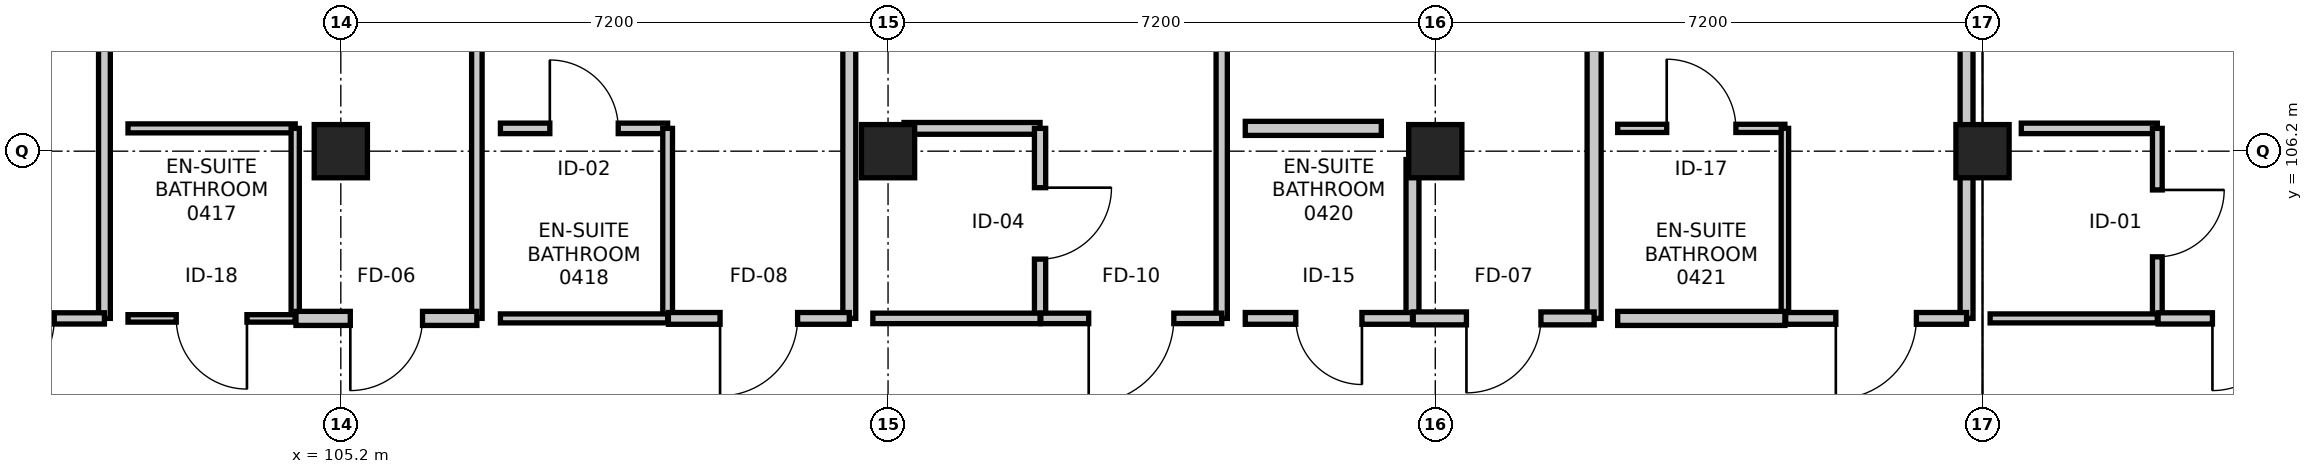
"""IFC4 building model, lengths in metres.
Left out: names, types, materials, properties, quantities, classifications, styles, units other than length and angle.
Written with IfcOpenShell. Run it as: python <this file> out.ifc"""

import sys

from ifc_helpers import new_model, si_unit, direction, frame, frame_2d, origin, origin_2d, place, context, subcontext, project, spatial, rectangle, extrude, element, fill, save


model = new_model("IFC4")
c1 = context("Model", 3, precision=1e-05, world=origin(), true_north=direction((0.0, 1.0)))
c2 = subcontext(c1, "Body", "Model", "MODEL_VIEW")
j1 = project(units=[si_unit("LENGTHUNIT", "METRE"), si_unit("PLANEANGLEUNIT", "RADIAN")], contexts=[c1])
p1 = place(None, origin())
s1 = spatial("IfcSite", under=j1, at=p1, CompositionType="ELEMENT")
p2 = place(p1, origin())
s2 = spatial("IfcBuilding", under=s1, at=p2, CompositionType="ELEMENT")
p3 = place(p2, frame((0.0, 0.0, 19.2)))
s3 = spatial("IfcBuildingStorey", under=s2, at=p3, CompositionType="ELEMENT", Elevation=19.2)
for number, where, z_axis, x_axis in (
    (1, (105.2, 106.2, 0.0), (0.0, 0.0, 1.0), (1.0, 0.0, 0.0)),
    (2, (112.4, 106.2, 0.0), (0.0, 0.0, 1.0), (1.0, 0.0, 0.0)),
    (3, (119.6, 106.2, 0.0), (0.0, 0.0, 1.0), (1.0, 0.0, 0.0)),
    (4, (126.8, 106.2, 0.0), (0.0, 0.0, 1.0), (1.0, 0.0, 0.0)),
):
    element("IfcColumn", number, at=place(p3, frame(where, z_axis=z_axis, x_axis=x_axis)), inside=s3, PredefinedType="COLUMN", context=c2, shape_type="SweptSolid", body=[
        extrude(rectangle(XDim=0.7, YDim=0.7, at=origin_2d()), origin(), (0.0, 0.0, 1.0), 3.6),
    ])
p4 = place(p3, frame((102.09, 116.126, 0.0), z_axis=(0.0, 0.0, 1.0), x_axis=(0.0, -1.0, 0.0)))
e5 = element("IfcWall", 5, at=p4, inside=s3, PredefinedType="PARTITIONING", context=c2, shape_type="SweptSolid", body=[
    extrude(rectangle(XDim=12.126, YDim=0.155, at=frame_2d((6.063, 0.0))), origin(), (0.0, 0.0, 1.0), 2.735),
])
p5 = place(p3, frame((102.09, 104.0, 0.0), z_axis=(0.0, 0.0, 1.0), x_axis=(-1.0, 0.0, 0.0)))
e6 = element("IfcWall", 6, at=p5, inside=s3, PredefinedType="PARTITIONING", context=c2, shape_type="SweptSolid", body=[
    extrude(rectangle(XDim=2.38, YDim=0.148, at=frame_2d((1.19, 0.0))), origin(), (0.0, 0.0, 1.0), 3.35),
])
p6 = place(p5, frame((0.66, 0.0, 0.0)))
e7 = element("IfcOpeningElement", 7, at=p6, cuts=e6, PredefinedType="OPENING", context=c2, shape_type="SweptSolid", body=[
    extrude(rectangle(XDim=1.06, YDim=2.2, at=frame_2d((0.53, 1.1))), frame((0.0, 0.084, 0.0), z_axis=(0.0, -1.0, 0.0), x_axis=(1.0, 0.0, 0.0)), (0.0, 0.0, 1.0), 0.168),
])
p7 = place(p3, frame((102.4, 106.5, 0.0), z_axis=(0.0, 0.0, 1.0), x_axis=(1.0, 0.0, 0.0)))
e8 = element("IfcWall", 8, at=p7, inside=s3, PredefinedType="PARTITIONING", context=c2, shape_type="SweptSolid", body=[
    extrude(rectangle(XDim=2.2, YDim=0.118, at=frame_2d((1.1, 0.0))), origin(), (0.0, 0.0, 1.0), 3.35),
])
p8 = place(p3, frame((104.6, 106.5, 0.0), z_axis=(0.0, 0.0, 1.0), x_axis=(0.0, -1.0, 0.0)))
e9 = element("IfcWall", 9, at=p8, inside=s3, PredefinedType="PARTITIONING", context=c2, shape_type="SweptSolid", body=[
    extrude(rectangle(XDim=2.5, YDim=0.108, at=frame_2d((1.25, 0.0))), origin(), (0.0, 0.0, 1.0), 2.735),
])
p9 = place(p3, frame((104.6, 104.0, 0.0), z_axis=(0.0, 0.0, 1.0), x_axis=(-1.0, 0.0, 0.0)))
e10 = element("IfcWall", 10, at=p9, inside=s3, PredefinedType="PARTITIONING", context=c2, shape_type="SweptSolid", body=[
    extrude(rectangle(XDim=2.2, YDim=0.098, at=frame_2d((1.1, 0.0))), origin(), (0.0, 0.0, 1.0), 3.35),
])
p10 = place(p9, frame((0.635, 0.0, 0.0)))
e11 = element("IfcOpeningElement", 11, at=p10, cuts=e10, PredefinedType="OPENING", context=c2, shape_type="SweptSolid", body=[
    extrude(rectangle(XDim=0.93, YDim=2.13, at=frame_2d((0.465, 1.065))), frame((0.0, 0.059, 0.0), z_axis=(0.0, -1.0, 0.0), x_axis=(1.0, 0.0, 0.0)), (0.0, 0.0, 1.0), 0.118),
])
p11 = place(p3, frame((106.99, 116.04, 0.0), z_axis=(0.0, 0.0, 1.0), x_axis=(0.0, -1.0, 0.0)))
e12 = element("IfcWall", 12, at=p11, inside=s3, PredefinedType="PARTITIONING", context=c2, shape_type="SweptSolid", body=[
    extrude(rectangle(XDim=12.04, YDim=0.138, at=frame_2d((6.02, 0.0))), origin(), (0.0, 0.0, 1.0), 2.735),
])
p12 = place(p3, frame((106.99, 104.0, 0.0), z_axis=(0.0, 0.0, 1.0), x_axis=(-1.0, 0.0, 0.0)))
e13 = element("IfcWall", 13, at=p12, inside=s3, PredefinedType="PARTITIONING", context=c2, shape_type="SweptSolid", body=[
    extrude(rectangle(XDim=2.38, YDim=0.185, at=frame_2d((1.19, 0.0))), origin(), (0.0, 0.0, 1.0), 2.685),
])
p13 = place(p12, frame((0.715, 0.0, 0.0)))
e14 = element("IfcOpeningElement", 14, at=p13, cuts=e13, PredefinedType="OPENING", context=c2, shape_type="SweptSolid", body=[
    extrude(rectangle(XDim=0.95, YDim=2.1, at=frame_2d((0.475, 1.05))), frame((0.0, 0.103, 0.0), z_axis=(0.0, -1.0, 0.0), x_axis=(1.0, 0.0, 0.0)), (0.0, 0.0, 1.0), 0.205),
])
p14 = place(p3, frame((107.3, 106.5, 0.0), z_axis=(0.0, 0.0, 1.0), x_axis=(1.0, 0.0, 0.0)))
e15 = element("IfcWall", 15, at=p14, inside=s3, PredefinedType="PARTITIONING", context=c2, shape_type="SweptSolid", body=[
    extrude(rectangle(XDim=2.2, YDim=0.138, at=frame_2d((1.1, 0.0))), origin(), (0.0, 0.0, 1.0), 3.35),
])
p15 = place(p14, frame((0.65, 0.0, 0.0)))
e16 = element("IfcOpeningElement", 16, at=p15, cuts=e15, PredefinedType="OPENING", context=c2, shape_type="SweptSolid", body=[
    extrude(rectangle(XDim=0.9, YDim=2.08, at=frame_2d((0.45, 1.04))), frame((0.0, 0.079, 0.0), z_axis=(0.0, -1.0, 0.0), x_axis=(1.0, 0.0, 0.0)), (0.0, 0.0, 1.0), 0.158),
])
p16 = place(p3, frame((109.5, 106.5, 0.0), z_axis=(0.0, 0.0, 1.0), x_axis=(0.0, -1.0, 0.0)))
e17 = element("IfcWall", 17, at=p16, inside=s3, PredefinedType="PARTITIONING", context=c2, shape_type="SweptSolid", body=[
    extrude(rectangle(XDim=2.5, YDim=0.128, at=frame_2d((1.25, 0.0))), origin(), (0.0, 0.0, 1.0), 2.735),
])
p17 = place(p3, frame((109.5, 104.0, 0.0), z_axis=(0.0, 0.0, 1.0), x_axis=(-1.0, 0.0, 0.0)))
e18 = element("IfcWall", 18, at=p17, inside=s3, PredefinedType="PARTITIONING", context=c2, shape_type="SweptSolid", body=[
    extrude(rectangle(XDim=2.2, YDim=0.118, at=frame_2d((1.1, 0.0))), origin(), (0.0, 0.0, 1.0), 3.35),
])
p18 = place(p3, frame((111.89, 115.892, 0.0), z_axis=(0.0, 0.0, 1.0), x_axis=(0.0, -1.0, 0.0)))
e19 = element("IfcWall", 19, at=p18, inside=s3, PredefinedType="PARTITIONING", context=c2, shape_type="SweptSolid", body=[
    extrude(rectangle(XDim=11.892, YDim=0.17, at=frame_2d((5.946, 0.0))), origin(), (0.0, 0.0, 1.0), 2.735),
])
p19 = place(p3, frame((111.89, 104.0, 0.0), z_axis=(0.0, 0.0, 1.0), x_axis=(-1.0, 0.0, 0.0)))
e20 = element("IfcWall", 20, at=p19, inside=s3, PredefinedType="PARTITIONING", context=c2, shape_type="SweptSolid", body=[
    extrude(rectangle(XDim=2.38, YDim=0.155, at=frame_2d((1.19, 0.0))), origin(), (0.0, 0.0, 1.0), 3.35),
])
p20 = place(p19, frame((0.68, 0.0, 0.0)))
e21 = element("IfcOpeningElement", 21, at=p20, cuts=e20, PredefinedType="OPENING", context=c2, shape_type="SweptSolid", body=[
    extrude(rectangle(XDim=1.02, YDim=2.15, at=frame_2d((0.51, 1.075))), frame((0.0, 0.087, 0.0), z_axis=(0.0, -1.0, 0.0), x_axis=(1.0, 0.0, 0.0)), (0.0, 0.0, 1.0), 0.175),
])
p21 = place(p3, frame((112.61, 106.5, 0.0), z_axis=(0.0, 0.0, 1.0), x_axis=(1.0, 0.0, 0.0)))
e22 = element("IfcWall", 22, at=p21, inside=s3, PredefinedType="PARTITIONING", context=c2, shape_type="SweptSolid", body=[
    extrude(rectangle(XDim=1.79, YDim=0.155, at=frame_2d((0.895, 0.0))), origin(), (0.0, 0.0, 1.0), 2.685),
])
p22 = place(p3, frame((114.4, 106.5, 0.0), z_axis=(0.0, 0.0, 1.0), x_axis=(0.0, -1.0, 0.0)))
e23 = element("IfcWall", 23, at=p22, inside=s3, PredefinedType="PARTITIONING", context=c2, shape_type="SweptSolid", body=[
    extrude(rectangle(XDim=2.5, YDim=0.148, at=frame_2d((1.25, 0.0))), origin(), (0.0, 0.0, 1.0), 2.735),
])
p23 = place(p22, frame((0.78, 0.0, 0.0)))
e24 = element("IfcOpeningElement", 24, at=p23, cuts=e23, PredefinedType="OPENING", context=c2, shape_type="SweptSolid", body=[
    extrude(rectangle(XDim=0.94, YDim=2.12, at=frame_2d((0.47, 1.06))), frame((0.0, 0.084, 0.0), z_axis=(0.0, -1.0, 0.0), x_axis=(1.0, 0.0, 0.0)), (0.0, 0.0, 1.0), 0.168),
])
p24 = place(p3, frame((114.4, 104.0, 0.0), z_axis=(0.0, 0.0, 1.0), x_axis=(-1.0, 0.0, 0.0)))
e25 = element("IfcWall", 25, at=p24, inside=s3, PredefinedType="PARTITIONING", context=c2, shape_type="SweptSolid", body=[
    extrude(rectangle(XDim=2.2, YDim=0.138, at=frame_2d((1.1, 0.0))), origin(), (0.0, 0.0, 1.0), 2.685),
])
p25 = place(p3, frame((116.79, 115.687, 0.0), z_axis=(0.0, 0.0, 1.0), x_axis=(0.0, -1.0, 0.0)))
e26 = element("IfcWall", 26, at=p25, inside=s3, PredefinedType="PARTITIONING", context=c2, shape_type="SweptSolid", body=[
    extrude(rectangle(XDim=11.687, YDim=0.148, at=frame_2d((5.844, 0.0))), origin(), (0.0, 0.0, 1.0), 2.735),
])
p26 = place(p3, frame((116.79, 104.0, 0.0), z_axis=(0.0, 0.0, 1.0), x_axis=(-1.0, 0.0, 0.0)))
e27 = element("IfcWall", 27, at=p26, inside=s3, PredefinedType="PARTITIONING", context=c2, shape_type="SweptSolid", body=[
    extrude(rectangle(XDim=2.38, YDim=0.138, at=frame_2d((1.19, 0.0))), origin(), (0.0, 0.0, 1.0), 3.35),
])
p27 = place(p26, frame((0.63, 0.0, 0.0)))
e28 = element("IfcOpeningElement", 28, at=p27, cuts=e27, PredefinedType="OPENING", context=c2, shape_type="SweptSolid", body=[
    extrude(rectangle(XDim=1.12, YDim=2.2, at=frame_2d((0.56, 1.1))), frame((0.0, 0.079, 0.0), z_axis=(0.0, -1.0, 0.0), x_axis=(1.0, 0.0, 0.0)), (0.0, 0.0, 1.0), 0.158),
])
p28 = place(p3, frame((117.1, 106.5, 0.0), z_axis=(0.0, 0.0, 1.0), x_axis=(1.0, 0.0, 0.0)))
e29 = element("IfcWall", 29, at=p28, inside=s3, PredefinedType="PARTITIONING", context=c2, shape_type="SweptSolid", body=[
    extrude(rectangle(XDim=1.79, YDim=0.185, at=frame_2d((0.895, 0.0))), origin(), (0.0, 0.0, 1.0), 2.735),
])
p29 = place(p3, frame((119.3, 106.09, 0.0), z_axis=(0.0, 0.0, 1.0), x_axis=(0.0, -1.0, 0.0)))
e30 = element("IfcWall", 30, at=p29, inside=s3, PredefinedType="PARTITIONING", context=c2, shape_type="SweptSolid", body=[
    extrude(rectangle(XDim=2.09, YDim=0.17, at=frame_2d((1.045, 0.0))), origin(), (0.0, 0.0, 1.0), 2.685),
])
p30 = place(p3, frame((119.3, 104.0, 0.0), z_axis=(0.0, 0.0, 1.0), x_axis=(-1.0, 0.0, 0.0)))
e31 = element("IfcWall", 31, at=p30, inside=s3, PredefinedType="PARTITIONING", context=c2, shape_type="SweptSolid", body=[
    extrude(rectangle(XDim=2.2, YDim=0.155, at=frame_2d((1.1, 0.0))), origin(), (0.0, 0.0, 1.0), 3.35),
])
p31 = place(p30, frame((0.665, 0.0, 0.0)))
e32 = element("IfcOpeningElement", 32, at=p31, cuts=e31, PredefinedType="OPENING", context=c2, shape_type="SweptSolid", body=[
    extrude(rectangle(XDim=0.87, YDim=2.07, at=frame_2d((0.435, 1.035))), frame((0.0, 0.087, 0.0), z_axis=(0.0, -1.0, 0.0), x_axis=(1.0, 0.0, 0.0)), (0.0, 0.0, 1.0), 0.175),
])
p32 = place(p3, frame((121.69, 115.433, 0.0), z_axis=(0.0, 0.0, 1.0), x_axis=(0.0, -1.0, 0.0)))
e33 = element("IfcWall", 33, at=p32, inside=s3, PredefinedType="PARTITIONING", context=c2, shape_type="SweptSolid", body=[
    extrude(rectangle(XDim=11.433, YDim=0.185, at=frame_2d((5.716, 0.0))), origin(), (0.0, 0.0, 1.0), 2.735),
])
p33 = place(p3, frame((121.69, 104.0, 0.0), z_axis=(0.0, 0.0, 1.0), x_axis=(-1.0, 0.0, 0.0)))
e34 = element("IfcWall", 34, at=p33, inside=s3, PredefinedType="PARTITIONING", context=c2, shape_type="SweptSolid", body=[
    extrude(rectangle(XDim=2.38, YDim=0.17, at=frame_2d((1.19, 0.0))), origin(), (0.0, 0.0, 1.0), 2.685),
])
p34 = place(p33, frame((0.7, 0.0, 0.0)))
e35 = element("IfcOpeningElement", 35, at=p34, cuts=e34, PredefinedType="OPENING", context=c2, shape_type="SweptSolid", body=[
    extrude(rectangle(XDim=0.98, YDim=2.15, at=frame_2d((0.49, 1.075))), frame((0.0, 0.095, 0.0), z_axis=(0.0, -1.0, 0.0), x_axis=(1.0, 0.0, 0.0)), (0.0, 0.0, 1.0), 0.19),
])
p35 = place(p3, frame((122.0, 106.5, 0.0), z_axis=(0.0, 0.0, 1.0), x_axis=(1.0, 0.0, 0.0)))
e36 = element("IfcWall", 36, at=p35, inside=s3, PredefinedType="PARTITIONING", context=c2, shape_type="SweptSolid", body=[
    extrude(rectangle(XDim=2.2, YDim=0.108, at=frame_2d((1.1, 0.0))), origin(), (0.0, 0.0, 1.0), 3.35),
])
p36 = place(p35, frame((0.645, 0.0, 0.0)))
e37 = element("IfcOpeningElement", 37, at=p36, cuts=e36, PredefinedType="OPENING", context=c2, shape_type="SweptSolid", body=[
    extrude(rectangle(XDim=0.91, YDim=2.11, at=frame_2d((0.455, 1.055))), frame((0.0, 0.064, 0.0), z_axis=(0.0, -1.0, 0.0), x_axis=(1.0, 0.0, 0.0)), (0.0, 0.0, 1.0), 0.128),
])
p37 = place(p3, frame((124.2, 106.5, 0.0), z_axis=(0.0, 0.0, 1.0), x_axis=(0.0, -1.0, 0.0)))
e38 = element("IfcWall", 38, at=p37, inside=s3, PredefinedType="PARTITIONING", context=c2, shape_type="SweptSolid", body=[
    extrude(rectangle(XDim=2.5, YDim=0.098, at=frame_2d((1.25, 0.0))), origin(), (0.0, 0.0, 1.0), 2.735),
])
p38 = place(p3, frame((124.2, 104.0, 0.0), z_axis=(0.0, 0.0, 1.0), x_axis=(-1.0, 0.0, 0.0)))
e39 = element("IfcWall", 39, at=p38, inside=s3, PredefinedType="PARTITIONING", context=c2, shape_type="SweptSolid", body=[
    extrude(rectangle(XDim=2.2, YDim=0.185, at=frame_2d((1.1, 0.0))), origin(), (0.0, 0.0, 1.0), 3.35),
])
p39 = place(p3, frame((126.59, 114.777, 0.0), z_axis=(0.0, 0.0, 1.0), x_axis=(0.0, -1.0, 0.0)))
e40 = element("IfcWall", 40, at=p39, inside=s3, PredefinedType="PARTITIONING", context=c2, shape_type="SweptSolid", body=[
    extrude(rectangle(XDim=10.777, YDim=0.17, at=frame_2d((5.389, 0.0))), origin(), (0.0, 0.0, 1.0), 2.685),
])
p40 = place(p3, frame((126.59, 104.0, 0.0), z_axis=(0.0, 0.0, 1.0), x_axis=(-1.0, 0.0, 0.0)))
e41 = element("IfcWall", 41, at=p40, inside=s3, PredefinedType="PARTITIONING", context=c2, shape_type="SweptSolid", body=[
    extrude(rectangle(XDim=2.38, YDim=0.155, at=frame_2d((1.19, 0.0))), origin(), (0.0, 0.0, 1.0), 2.685),
])
p41 = place(p40, frame((0.66, 0.0, 0.0)))
e42 = element("IfcOpeningElement", 42, at=p41, cuts=e41, PredefinedType="OPENING", context=c2, shape_type="SweptSolid", body=[
    extrude(rectangle(XDim=1.06, YDim=2.2, at=frame_2d((0.53, 1.1))), frame((0.0, 0.087, 0.0), z_axis=(0.0, -1.0, 0.0), x_axis=(1.0, 0.0, 0.0)), (0.0, 0.0, 1.0), 0.175),
])
p42 = place(p3, frame((127.31, 106.5, 0.0), z_axis=(0.0, 0.0, 1.0), x_axis=(1.0, 0.0, 0.0)))
e43 = element("IfcWall", 43, at=p42, inside=s3, PredefinedType="PARTITIONING", context=c2, shape_type="SweptSolid", body=[
    extrude(rectangle(XDim=1.79, YDim=0.138, at=frame_2d((0.895, 0.0))), origin(), (0.0, 0.0, 1.0), 3.35),
])
p43 = place(p3, frame((129.1, 106.5, 0.0), z_axis=(0.0, 0.0, 1.0), x_axis=(0.0, -1.0, 0.0)))
e44 = element("IfcWall", 44, at=p43, inside=s3, PredefinedType="PARTITIONING", context=c2, shape_type="SweptSolid", body=[
    extrude(rectangle(XDim=2.5, YDim=0.128, at=frame_2d((1.25, 0.0))), origin(), (0.0, 0.0, 1.0), 2.735),
])
p44 = place(p43, frame((0.81, 0.0, 0.0)))
e45 = element("IfcOpeningElement", 45, at=p44, cuts=e44, PredefinedType="OPENING", context=c2, shape_type="SweptSolid", body=[
    extrude(rectangle(XDim=0.88, YDim=2.06, at=frame_2d((0.44, 1.03))), frame((0.0, 0.074, 0.0), z_axis=(0.0, -1.0, 0.0), x_axis=(1.0, 0.0, 0.0)), (0.0, 0.0, 1.0), 0.148),
])
p45 = place(p3, frame((129.1, 104.0, 0.0), z_axis=(0.0, 0.0, 1.0), x_axis=(-1.0, 0.0, 0.0)))
e46 = element("IfcWall", 46, at=p45, inside=s3, PredefinedType="PARTITIONING", context=c2, shape_type="SweptSolid", body=[
    extrude(rectangle(XDim=2.2, YDim=0.118, at=frame_2d((1.1, 0.0))), origin(), (0.0, 0.0, 1.0), 2.685),
])
p46 = place(p3, frame((131.49, 104.0, 0.0), z_axis=(0.0, 0.0, 1.0), x_axis=(-1.0, 0.0, 0.0)))
e47 = element("IfcWall", 47, at=p46, inside=s3, PredefinedType="PARTITIONING", context=c2, shape_type="SweptSolid", body=[
    extrude(rectangle(XDim=2.38, YDim=0.148, at=frame_2d((1.19, 0.0))), origin(), (0.0, 0.0, 1.0), 3.35),
])
p47 = place(p46, frame((0.715, 0.0, 0.0)))
e48 = element("IfcOpeningElement", 48, at=p47, cuts=e47, PredefinedType="OPENING", context=c2, shape_type="SweptSolid", body=[
    extrude(rectangle(XDim=0.95, YDim=2.1, at=frame_2d((0.475, 1.05))), frame((0.0, 0.084, 0.0), z_axis=(0.0, -1.0, 0.0), x_axis=(1.0, 0.0, 0.0)), (0.0, 0.0, 1.0), 0.168),
])
p48 = place(p6, origin())
e49 = element("IfcDoor", 49, at=p48, inside=s3, OperationType="SINGLE_SWING_RIGHT", PredefinedType="DOOR", context=c2, shape_type="SweptSolid", body=[
    extrude(rectangle(XDim=1.06, YDim=2.2, at=frame_2d((0.53, 1.1))), frame((0.0, 0.025, 0.0), z_axis=(0.0, -1.0, 0.0), x_axis=(1.0, 0.0, 0.0)), (0.0, 0.0, 1.0), 0.05),
])
fill(e7, e49)
p49 = place(p10, origin())
e50 = element("IfcDoor", 50, at=p49, inside=s3, OperationType="SINGLE_SWING_LEFT", PredefinedType="DOOR", context=c2, shape_type="SweptSolid", body=[
    extrude(rectangle(XDim=0.93, YDim=2.13, at=frame_2d((0.465, 1.065))), frame((0.0, 0.025, 0.0), z_axis=(0.0, -1.0, 0.0), x_axis=(1.0, 0.0, 0.0)), (0.0, 0.0, 1.0), 0.05),
])
fill(e11, e50)
p50 = place(p13, origin())
e51 = element("IfcDoor", 51, at=p50, inside=s3, OperationType="SINGLE_SWING_RIGHT", PredefinedType="DOOR", context=c2, shape_type="SweptSolid", body=[
    extrude(rectangle(XDim=0.95, YDim=2.1, at=frame_2d((0.475, 1.05))), frame((0.0, 0.025, 0.0), z_axis=(0.0, -1.0, 0.0), x_axis=(1.0, 0.0, 0.0)), (0.0, 0.0, 1.0), 0.05),
])
fill(e14, e51)
p51 = place(p15, origin())
e52 = element("IfcDoor", 52, at=p51, inside=s3, OperationType="SINGLE_SWING_LEFT", PredefinedType="DOOR", context=c2, shape_type="SweptSolid", body=[
    extrude(rectangle(XDim=0.9, YDim=2.08, at=frame_2d((0.45, 1.04))), frame((0.0, 0.025, 0.0), z_axis=(0.0, -1.0, 0.0), x_axis=(1.0, 0.0, 0.0)), (0.0, 0.0, 1.0), 0.05),
])
fill(e16, e52)
p52 = place(p20, origin())
e53 = element("IfcDoor", 53, at=p52, inside=s3, OperationType="SINGLE_SWING_RIGHT", PredefinedType="DOOR", context=c2, shape_type="SweptSolid", body=[
    extrude(rectangle(XDim=1.02, YDim=2.15, at=frame_2d((0.51, 1.075))), frame((0.0, 0.025, 0.0), z_axis=(0.0, -1.0, 0.0), x_axis=(1.0, 0.0, 0.0)), (0.0, 0.0, 1.0), 0.05),
])
fill(e21, e53)
p53 = place(p23, origin())
e54 = element("IfcDoor", 54, at=p53, inside=s3, OperationType="SINGLE_SWING_LEFT", PredefinedType="DOOR", context=c2, shape_type="SweptSolid", body=[
    extrude(rectangle(XDim=0.94, YDim=2.12, at=frame_2d((0.47, 1.06))), frame((0.0, 0.025, 0.0), z_axis=(0.0, -1.0, 0.0), x_axis=(1.0, 0.0, 0.0)), (0.0, 0.0, 1.0), 0.05),
])
fill(e24, e54)
p54 = place(p27, origin())
e55 = element("IfcDoor", 55, at=p54, inside=s3, OperationType="SINGLE_SWING_RIGHT", PredefinedType="DOOR", context=c2, shape_type="SweptSolid", body=[
    extrude(rectangle(XDim=1.12, YDim=2.2, at=frame_2d((0.56, 1.1))), frame((0.0, 0.025, 0.0), z_axis=(0.0, -1.0, 0.0), x_axis=(1.0, 0.0, 0.0)), (0.0, 0.0, 1.0), 0.05),
])
fill(e28, e55)
p55 = place(p31, origin())
e56 = element("IfcDoor", 56, at=p55, inside=s3, OperationType="SINGLE_SWING_LEFT", PredefinedType="DOOR", context=c2, shape_type="SweptSolid", body=[
    extrude(rectangle(XDim=0.87, YDim=2.07, at=frame_2d((0.435, 1.035))), frame((0.0, 0.025, 0.0), z_axis=(0.0, -1.0, 0.0), x_axis=(1.0, 0.0, 0.0)), (0.0, 0.0, 1.0), 0.05),
])
fill(e32, e56)
p56 = place(p34, origin())
e57 = element("IfcDoor", 57, at=p56, inside=s3, OperationType="SINGLE_SWING_RIGHT", PredefinedType="DOOR", context=c2, shape_type="SweptSolid", body=[
    extrude(rectangle(XDim=0.98, YDim=2.15, at=frame_2d((0.49, 1.075))), frame((0.0, 0.025, 0.0), z_axis=(0.0, -1.0, 0.0), x_axis=(1.0, 0.0, 0.0)), (0.0, 0.0, 1.0), 0.05),
])
fill(e35, e57)
p57 = place(p36, origin())
e58 = element("IfcDoor", 58, at=p57, inside=s3, OperationType="SINGLE_SWING_LEFT", PredefinedType="DOOR", context=c2, shape_type="SweptSolid", body=[
    extrude(rectangle(XDim=0.91, YDim=2.11, at=frame_2d((0.455, 1.055))), frame((0.0, 0.025, 0.0), z_axis=(0.0, -1.0, 0.0), x_axis=(1.0, 0.0, 0.0)), (0.0, 0.0, 1.0), 0.05),
])
fill(e37, e58)
p58 = place(p41, origin())
e59 = element("IfcDoor", 59, at=p58, inside=s3, OperationType="SINGLE_SWING_RIGHT", PredefinedType="DOOR", context=c2, shape_type="SweptSolid", body=[
    extrude(rectangle(XDim=1.06, YDim=2.2, at=frame_2d((0.53, 1.1))), frame((0.0, 0.025, 0.0), z_axis=(0.0, -1.0, 0.0), x_axis=(1.0, 0.0, 0.0)), (0.0, 0.0, 1.0), 0.05),
])
fill(e42, e59)
p59 = place(p44, origin())
e60 = element("IfcDoor", 60, at=p59, inside=s3, OperationType="SINGLE_SWING_LEFT", PredefinedType="DOOR", context=c2, shape_type="SweptSolid", body=[
    extrude(rectangle(XDim=0.88, YDim=2.06, at=frame_2d((0.44, 1.03))), frame((0.0, 0.025, 0.0), z_axis=(0.0, -1.0, 0.0), x_axis=(1.0, 0.0, 0.0)), (0.0, 0.0, 1.0), 0.05),
])
fill(e45, e60)
p60 = place(p47, origin())
e61 = element("IfcDoor", 61, at=p60, inside=s3, OperationType="SINGLE_SWING_RIGHT", PredefinedType="DOOR", context=c2, shape_type="SweptSolid", body=[
    extrude(rectangle(XDim=0.95, YDim=2.1, at=frame_2d((0.475, 1.05))), frame((0.0, 0.025, 0.0), z_axis=(0.0, -1.0, 0.0), x_axis=(1.0, 0.0, 0.0)), (0.0, 0.0, 1.0), 0.05),
])
fill(e48, e61)
save(model, sys.argv[1])
